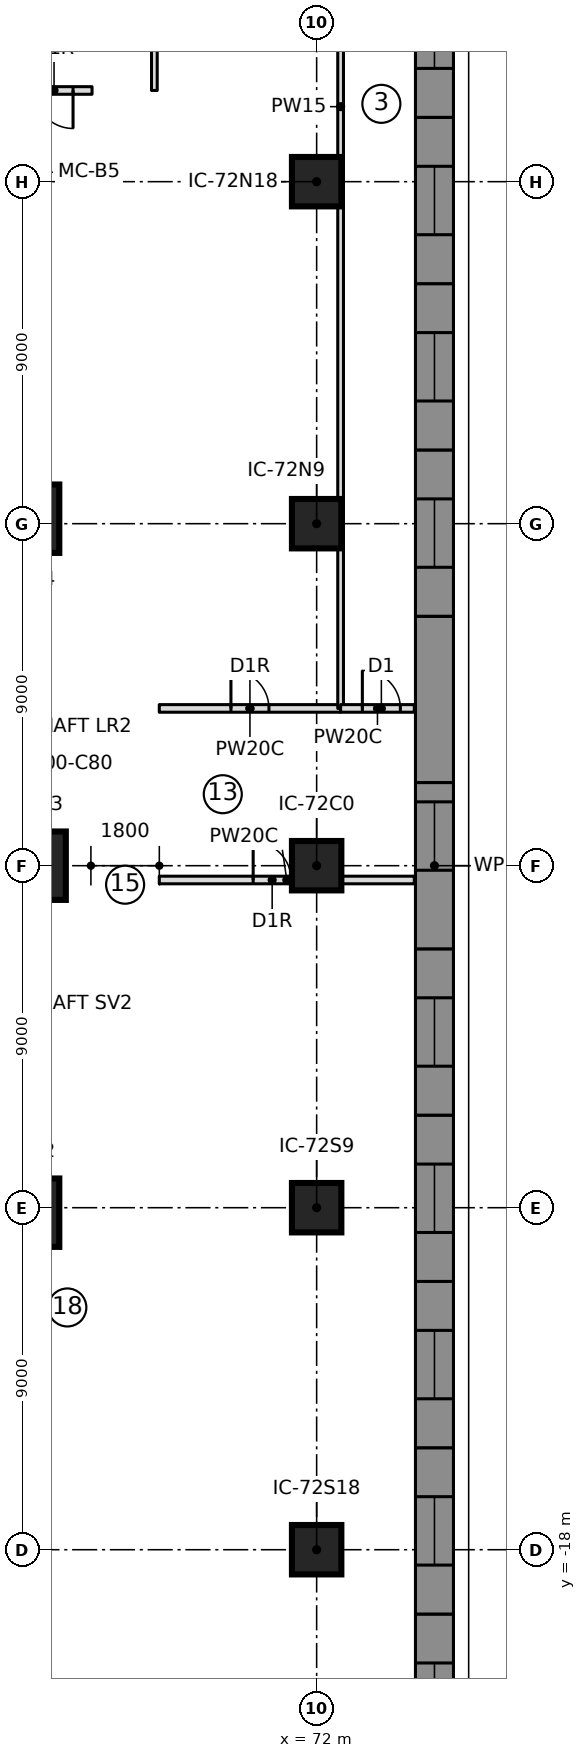
"""IFC4 building model, lengths in metres.
Left out: names, types, materials, properties, quantities, classifications, styles, units other than length and angle.
Written with IfcOpenShell. Run it as: python <this file> out.ifc"""

import sys

from ifc_helpers import new_model, si_unit, direction, frame, frame_2d, origin, origin_2d, place, context, subcontext, project, spatial, polyline, rectangle, outline, extrude, element, fill, save


model = new_model("IFC4")
c1 = context("Model", 3, precision=1e-05, world=origin(), true_north=direction((0.0, 1.0)))
c2 = subcontext(c1, "Body", "Model", "MODEL_VIEW")
j1 = project(units=[si_unit("LENGTHUNIT", "METRE"), si_unit("PLANEANGLEUNIT", "RADIAN")], contexts=[c1])
p1 = place(None, origin())
s1 = spatial("IfcSite", under=j1, at=p1, CompositionType="ELEMENT")
p2 = place(p1, origin())
s2 = spatial("IfcBuilding", under=s1, at=p2, CompositionType="ELEMENT")
p3 = place(p2, frame((0.0, 0.0, 13.5)))
s3 = spatial("IfcBuildingStorey", under=s2, at=p3, CompositionType="ELEMENT", Elevation=13.5)
for number, where, z_axis, x_axis in (
    (1, (64.328, -9.131, 0.0), (0.0, 0.0, 1.0), (1.0, 0.0, 0.0)),
    (2, (64.5, 0.0, 0.0), (0.0, 0.0, 1.0), (1.0, 0.0, 0.0)),
    (3, (64.328, 9.131, 0.0), (0.0, 0.0, 1.0), (1.0, 0.0, 0.0)),
):
    element("IfcColumn", number, at=place(p3, frame(where, z_axis=z_axis, x_axis=x_axis)), inside=s3, PredefinedType="COLUMN", context=c2, shape_type="SweptSolid", body=[
        extrude(rectangle(XDim=1.8, YDim=1.8, at=origin_2d()), origin(), (0.0, 0.0, 1.0), 5.5),
    ])
for number, where, z_axis, x_axis in (
    (4, (72.0, -18.0, 0.0), (0.0, 0.0, 1.0), (1.0, 0.0, 0.0)),
    (5, (72.0, -9.0, 0.0), (0.0, 0.0, 1.0), (1.0, 0.0, 0.0)),
    (6, (72.0, 0.0, 0.0), (0.0, 0.0, 1.0), (1.0, 0.0, 0.0)),
    (7, (72.0, 9.0, 0.0), (0.0, 0.0, 1.0), (1.0, 0.0, 0.0)),
    (8, (72.0, 18.0, 0.0), (0.0, 0.0, 1.0), (1.0, 0.0, 0.0)),
):
    element("IfcColumn", number, at=place(p3, frame(where, z_axis=z_axis, x_axis=x_axis)), inside=s3, PredefinedType="COLUMN", context=c2, shape_type="SweptSolid", body=[
        extrude(rectangle(XDim=1.3, YDim=1.3, at=origin_2d()), origin(), (0.0, 0.0, 1.0), 5.5),
    ])
p4 = place(p3, frame((75.1, -24.069, 0.0), z_axis=(0.0, 0.0, 1.0), x_axis=(0.0, 1.0, 0.0)))
e9 = element("IfcWall", 9, at=p4, inside=s3, PredefinedType="NOTDEFINED", context=c2, shape_type="SweptSolid", body=[
    extrude(outline(polyline([(0.0, -0.5), (4.376, -0.5), (4.376, 0.5), (0.0, 0.5), (0.0, -0.5)])), origin(), (0.0, 0.0, 1.0), 5.2),
])
p5 = place(p4, frame((1.288, 0.0, 0.9)))
e10 = element("IfcOpeningElement", 10, at=p5, cuts=e9, PredefinedType="OPENING", context=c2, shape_type="SweptSolid", body=[
    extrude(rectangle(XDim=1.8, YDim=2.4, at=frame_2d((0.9, 1.2))), frame((0.0, 0.51, 0.0), z_axis=(0.0, -1.0, 0.0), x_axis=(1.0, 0.0, 0.0)), (0.0, 0.0, 1.0), 1.02),
])
p6 = place(p3, frame((75.1, -19.693, 0.0), z_axis=(0.0, 0.0, 1.0), x_axis=(0.0, 1.0, 0.0)))
e11 = element("IfcWall", 11, at=p6, inside=s3, PredefinedType="NOTDEFINED", context=c2, shape_type="SweptSolid", body=[
    extrude(outline(polyline([(0.0, -0.5), (4.376, -0.5), (4.376, 0.5), (0.0, 0.5), (0.0, -0.5)])), origin(), (0.0, 0.0, 1.0), 5.2),
])
p7 = place(p6, frame((1.288, 0.0, 0.9)))
e12 = element("IfcOpeningElement", 12, at=p7, cuts=e11, PredefinedType="OPENING", context=c2, shape_type="SweptSolid", body=[
    extrude(rectangle(XDim=1.8, YDim=2.4, at=frame_2d((0.9, 1.2))), frame((0.0, 0.51, 0.0), z_axis=(0.0, -1.0, 0.0), x_axis=(1.0, 0.0, 0.0)), (0.0, 0.0, 1.0), 1.02),
])
p8 = place(p3, frame((75.1, -15.316, 0.0), z_axis=(0.0, 0.0, 1.0), x_axis=(0.0, 1.0, 0.0)))
e13 = element("IfcWall", 13, at=p8, inside=s3, PredefinedType="NOTDEFINED", context=c2, shape_type="SweptSolid", body=[
    extrude(outline(polyline([(0.0, -0.5), (4.376, -0.5), (4.376, 0.5), (0.0, 0.5), (0.0, -0.5)])), origin(), (0.0, 0.0, 1.0), 5.2),
])
p9 = place(p8, frame((1.288, 0.0, 0.9)))
e14 = element("IfcOpeningElement", 14, at=p9, cuts=e13, PredefinedType="OPENING", context=c2, shape_type="SweptSolid", body=[
    extrude(rectangle(XDim=1.8, YDim=2.4, at=frame_2d((0.9, 1.2))), frame((0.0, 0.51, 0.0), z_axis=(0.0, -1.0, 0.0), x_axis=(1.0, 0.0, 0.0)), (0.0, 0.0, 1.0), 1.02),
])
p10 = place(p3, frame((75.1, -10.94, 0.0), z_axis=(0.0, 0.0, 1.0), x_axis=(0.0, 1.0, 0.0)))
e15 = element("IfcWall", 15, at=p10, inside=s3, PredefinedType="NOTDEFINED", context=c2, shape_type="SweptSolid", body=[
    extrude(outline(polyline([(0.0, -0.5), (4.376, -0.5), (4.376, 0.5), (0.0, 0.5), (0.0, -0.5)])), origin(), (0.0, 0.0, 1.0), 5.2),
])
p11 = place(p10, frame((1.288, 0.0, 0.9)))
e16 = element("IfcOpeningElement", 16, at=p11, cuts=e15, PredefinedType="OPENING", context=c2, shape_type="SweptSolid", body=[
    extrude(rectangle(XDim=1.8, YDim=2.4, at=frame_2d((0.9, 1.2))), frame((0.0, 0.51, 0.0), z_axis=(0.0, -1.0, 0.0), x_axis=(1.0, 0.0, 0.0)), (0.0, 0.0, 1.0), 1.02),
])
p12 = place(p3, frame((75.1, -6.564, 0.0), z_axis=(0.0, 0.0, 1.0), x_axis=(0.0, 1.0, 0.0)))
e17 = element("IfcWall", 17, at=p12, inside=s3, PredefinedType="NOTDEFINED", context=c2, shape_type="SweptSolid", body=[
    extrude(outline(polyline([(0.0, -0.5), (4.376, -0.5), (4.376, 0.5), (0.0, 0.5), (0.0, -0.5)])), origin(), (0.0, 0.0, 1.0), 5.2),
])
p13 = place(p12, frame((1.288, 0.0, 0.9)))
e18 = element("IfcOpeningElement", 18, at=p13, cuts=e17, PredefinedType="OPENING", context=c2, shape_type="SweptSolid", body=[
    extrude(rectangle(XDim=1.8, YDim=2.4, at=frame_2d((0.9, 1.2))), frame((0.0, 0.51, 0.0), z_axis=(0.0, -1.0, 0.0), x_axis=(1.0, 0.0, 0.0)), (0.0, 0.0, 1.0), 1.02),
])
p14 = place(p3, frame((75.1, -2.188, 0.0), z_axis=(0.0, 0.0, 1.0), x_axis=(0.0, 1.0, 0.0)))
e19 = element("IfcWall", 19, at=p14, inside=s3, PredefinedType="NOTDEFINED", context=c2, shape_type="SweptSolid", body=[
    extrude(outline(polyline([(0.0, -0.5), (4.376, -0.5), (4.376, 0.5), (0.0, 0.5), (0.0, -0.5)])), origin(), (0.0, 0.0, 1.0), 5.2),
])
p15 = place(p14, frame((2.068, 0.0, 0.9)))
e20 = element("IfcOpeningElement", 20, at=p15, cuts=e19, PredefinedType="OPENING", context=c2, shape_type="SweptSolid", body=[
    extrude(rectangle(XDim=1.8, YDim=2.4, at=frame_2d((0.9, 1.2))), frame((0.0, 0.51, 0.0), z_axis=(0.0, -1.0, 0.0), x_axis=(1.0, 0.0, 0.0)), (0.0, 0.0, 1.0), 1.02),
])
p16 = place(p3, frame((75.1, 2.188, 0.0), z_axis=(0.0, 0.0, 1.0), x_axis=(0.0, 1.0, 0.0)))
e21 = element("IfcWall", 21, at=p16, inside=s3, PredefinedType="NOTDEFINED", context=c2, shape_type="SweptSolid", body=[
    extrude(outline(polyline([(0.0, -0.5), (4.376, -0.5), (4.376, 0.5), (0.0, 0.5), (0.0, -0.5)])), origin(), (0.0, 0.0, 1.0), 5.2),
])
p17 = place(p3, frame((75.1, 6.564, 0.0), z_axis=(0.0, 0.0, 1.0), x_axis=(0.0, 1.0, 0.0)))
e22 = element("IfcWall", 22, at=p17, inside=s3, PredefinedType="NOTDEFINED", context=c2, shape_type="SweptSolid", body=[
    extrude(outline(polyline([(0.0, -0.5), (4.376, -0.5), (4.376, 0.5), (0.0, 0.5), (0.0, -0.5)])), origin(), (0.0, 0.0, 1.0), 5.2),
])
p18 = place(p17, frame((1.288, 0.0, 0.9)))
e23 = element("IfcOpeningElement", 23, at=p18, cuts=e22, PredefinedType="OPENING", context=c2, shape_type="SweptSolid", body=[
    extrude(rectangle(XDim=1.8, YDim=2.4, at=frame_2d((0.9, 1.2))), frame((0.0, 0.51, 0.0), z_axis=(0.0, -1.0, 0.0), x_axis=(1.0, 0.0, 0.0)), (0.0, 0.0, 1.0), 1.02),
])
p19 = place(p3, frame((75.1, 10.94, 0.0), z_axis=(0.0, 0.0, 1.0), x_axis=(0.0, 1.0, 0.0)))
e24 = element("IfcWall", 24, at=p19, inside=s3, PredefinedType="NOTDEFINED", context=c2, shape_type="SweptSolid", body=[
    extrude(outline(polyline([(0.0, -0.5), (4.376, -0.5), (4.376, 0.5), (0.0, 0.5), (0.0, -0.5)])), origin(), (0.0, 0.0, 1.0), 5.2),
])
p20 = place(p19, frame((1.288, 0.0, 0.9)))
e25 = element("IfcOpeningElement", 25, at=p20, cuts=e24, PredefinedType="OPENING", context=c2, shape_type="SweptSolid", body=[
    extrude(rectangle(XDim=1.8, YDim=2.4, at=frame_2d((0.9, 1.2))), frame((0.0, 0.51, 0.0), z_axis=(0.0, -1.0, 0.0), x_axis=(1.0, 0.0, 0.0)), (0.0, 0.0, 1.0), 1.02),
])
p21 = place(p3, frame((75.1, 15.316, 0.0), z_axis=(0.0, 0.0, 1.0), x_axis=(0.0, 1.0, 0.0)))
e26 = element("IfcWall", 26, at=p21, inside=s3, PredefinedType="NOTDEFINED", context=c2, shape_type="SweptSolid", body=[
    extrude(outline(polyline([(0.0, -0.5), (4.376, -0.5), (4.376, 0.5), (0.0, 0.5), (0.0, -0.5)])), origin(), (0.0, 0.0, 1.0), 5.2),
])
p22 = place(p21, frame((1.288, 0.0, 0.9)))
e27 = element("IfcOpeningElement", 27, at=p22, cuts=e26, PredefinedType="OPENING", context=c2, shape_type="SweptSolid", body=[
    extrude(rectangle(XDim=1.8, YDim=2.4, at=frame_2d((0.9, 1.2))), frame((0.0, 0.51, 0.0), z_axis=(0.0, -1.0, 0.0), x_axis=(1.0, 0.0, 0.0)), (0.0, 0.0, 1.0), 1.02),
])
p23 = place(p3, frame((75.1, 19.693, 0.0), z_axis=(0.0, 0.0, 1.0), x_axis=(0.0, 1.0, 0.0)))
e28 = element("IfcWall", 28, at=p23, inside=s3, PredefinedType="NOTDEFINED", context=c2, shape_type="SweptSolid", body=[
    extrude(outline(polyline([(0.0, -0.5), (4.376, -0.5), (4.376, 0.5), (0.0, 0.5), (0.0, -0.5)])), origin(), (0.0, 0.0, 1.0), 5.2),
])
p24 = place(p23, frame((1.288, 0.0, 0.9)))
e29 = element("IfcOpeningElement", 29, at=p24, cuts=e28, PredefinedType="OPENING", context=c2, shape_type="SweptSolid", body=[
    extrude(rectangle(XDim=1.8, YDim=2.4, at=frame_2d((0.9, 1.2))), frame((0.0, 0.51, 0.0), z_axis=(0.0, -1.0, 0.0), x_axis=(1.0, 0.0, 0.0)), (0.0, 0.0, 1.0), 1.02),
])
p25 = place(p3, frame((67.859, -0.376, 0.0), z_axis=(0.0, 0.0, 1.0), x_axis=(1.0, 0.0, 0.0)))
e30 = element("IfcWall", 30, at=p25, inside=s3, PredefinedType="PARTITIONING", context=c2, shape_type="SweptSolid", body=[
    extrude(rectangle(XDim=6.711, YDim=0.2, at=frame_2d((3.355, 0.0))), origin(), (0.0, 0.0, 1.0), 5.15),
])
p26 = place(p25, frame((2.47, 0.0, 0.0)))
e31 = element("IfcOpeningElement", 31, at=p26, cuts=e30, PredefinedType="OPENING", context=c2, shape_type="SweptSolid", body=[
    extrude(rectangle(XDim=1.0, YDim=2.1, at=frame_2d((0.5, 1.05))), frame((0.0, 0.11, 0.0), z_axis=(0.0, -1.0, 0.0), x_axis=(1.0, 0.0, 0.0)), (0.0, 0.0, 1.0), 0.22),
])
p27 = place(p3, frame((67.73, 20.4, 0.0), z_axis=(0.0, 0.0, 1.0), x_axis=(0.0, 1.0, 0.0)))
e32 = element("IfcWall", 32, at=p27, inside=s3, PredefinedType="PARTITIONING", context=c2, shape_type="SweptSolid", body=[
    extrude(rectangle(XDim=16.2, YDim=0.15, at=frame_2d((8.1, 0.0))), origin(), (0.0, 0.0, 1.0), 5.15),
])
p28 = place(p3, frame((67.859, 4.139, 0.0), z_axis=(0.0, 0.0, 1.0), x_axis=(1.0, 0.0, 0.0)))
e33 = element("IfcWall", 33, at=p28, inside=s3, PredefinedType="PARTITIONING", context=c2, shape_type="SweptSolid", body=[
    extrude(rectangle(XDim=4.772, YDim=0.2, at=frame_2d((2.386, 0.0))), origin(), (0.0, 0.0, 1.0), 5.15),
])
p29 = place(p28, frame((1.886, 0.0, 0.0)))
e34 = element("IfcOpeningElement", 34, at=p29, cuts=e33, PredefinedType="OPENING", context=c2, shape_type="SweptSolid", body=[
    extrude(rectangle(XDim=1.0, YDim=2.1, at=frame_2d((0.5, 1.05))), frame((0.0, 0.11, 0.0), z_axis=(0.0, -1.0, 0.0), x_axis=(1.0, 0.0, 0.0)), (0.0, 0.0, 1.0), 0.22),
])
p30 = place(p3, frame((72.631, 4.139, 0.0), z_axis=(0.0, 0.0, 1.0), x_axis=(0.0, 1.0, 0.0)))
e35 = element("IfcWall", 35, at=p30, inside=s3, PredefinedType="PARTITIONING", context=c2, shape_type="SweptSolid", body=[
    extrude(rectangle(XDim=31.67, YDim=0.15, at=frame_2d((15.835, 0.0))), origin(), (0.0, 0.0, 1.0), 5.15),
])
p31 = place(p3, frame((72.631, 4.139, 0.0), z_axis=(0.0, 0.0, 1.0), x_axis=(1.0, 0.0, 0.0)))
e36 = element("IfcWall", 36, at=p31, inside=s3, PredefinedType="PARTITIONING", context=c2, shape_type="SweptSolid", body=[
    extrude(rectangle(XDim=1.939, YDim=0.2, at=frame_2d((0.97, 0.0))), origin(), (0.0, 0.0, 1.0), 5.15),
])
p32 = place(p31, frame((0.572, 0.0, 0.0)))
e37 = element("IfcOpeningElement", 37, at=p32, cuts=e36, PredefinedType="OPENING", context=c2, shape_type="SweptSolid", body=[
    extrude(rectangle(XDim=1.0, YDim=2.1, at=frame_2d((0.5, 1.05))), frame((0.0, 0.11, 0.0), z_axis=(0.0, -1.0, 0.0), x_axis=(1.0, 0.0, 0.0)), (0.0, 0.0, 1.0), 0.22),
])
p33 = place(p3, frame((66.09, 20.4, 0.0), z_axis=(0.0, 0.0, 1.0), x_axis=(-1.0, 0.0, 0.0)))
e38 = element("IfcWall", 38, at=p33, inside=s3, PredefinedType="PARTITIONING", context=c2, shape_type="SweptSolid", body=[
    extrude(rectangle(XDim=4.487, YDim=0.2, at=frame_2d((2.243, 0.0))), origin(), (0.0, 0.0, 1.0), 5.15),
])
p34 = place(p33, frame((0.5, 0.0, 0.0)))
e39 = element("IfcOpeningElement", 39, at=p34, cuts=e38, PredefinedType="OPENING", context=c2, shape_type="SweptSolid", body=[
    extrude(rectangle(XDim=1.0, YDim=2.1, at=frame_2d((0.5, 1.05))), frame((0.0, 0.11, 0.0), z_axis=(0.0, -1.0, 0.0), x_axis=(1.0, 0.0, 0.0)), (0.0, 0.0, 1.0), 0.22),
])
p35 = place(p5, origin())
e40 = element("IfcWindow", 40, at=p35, inside=s3, PartitioningType="SINGLE_PANEL", PredefinedType="WINDOW", context=c2, shape_type="SweptSolid", body=[
    extrude(rectangle(XDim=1.8, YDim=2.4, at=frame_2d((0.9, 1.2))), frame((0.0, 0.5, 0.0), z_axis=(0.0, -1.0, 0.0), x_axis=(1.0, 0.0, 0.0)), (0.0, 0.0, 1.0), 0.06),
])
fill(e10, e40)
p36 = place(p7, origin())
e41 = element("IfcWindow", 41, at=p36, inside=s3, PartitioningType="SINGLE_PANEL", PredefinedType="WINDOW", context=c2, shape_type="SweptSolid", body=[
    extrude(rectangle(XDim=1.8, YDim=2.4, at=frame_2d((0.9, 1.2))), frame((0.0, 0.5, 0.0), z_axis=(0.0, -1.0, 0.0), x_axis=(1.0, 0.0, 0.0)), (0.0, 0.0, 1.0), 0.06),
])
fill(e12, e41)
p37 = place(p9, origin())
e42 = element("IfcWindow", 42, at=p37, inside=s3, PartitioningType="SINGLE_PANEL", PredefinedType="WINDOW", context=c2, shape_type="SweptSolid", body=[
    extrude(rectangle(XDim=1.8, YDim=2.4, at=frame_2d((0.9, 1.2))), frame((0.0, 0.5, 0.0), z_axis=(0.0, -1.0, 0.0), x_axis=(1.0, 0.0, 0.0)), (0.0, 0.0, 1.0), 0.06),
])
fill(e14, e42)
p38 = place(p11, origin())
e43 = element("IfcWindow", 43, at=p38, inside=s3, PartitioningType="SINGLE_PANEL", PredefinedType="WINDOW", context=c2, shape_type="SweptSolid", body=[
    extrude(rectangle(XDim=1.8, YDim=2.4, at=frame_2d((0.9, 1.2))), frame((0.0, 0.5, 0.0), z_axis=(0.0, -1.0, 0.0), x_axis=(1.0, 0.0, 0.0)), (0.0, 0.0, 1.0), 0.06),
])
fill(e16, e43)
p39 = place(p13, origin())
e44 = element("IfcWindow", 44, at=p39, inside=s3, PartitioningType="SINGLE_PANEL", PredefinedType="WINDOW", context=c2, shape_type="SweptSolid", body=[
    extrude(rectangle(XDim=1.8, YDim=2.4, at=frame_2d((0.9, 1.2))), frame((0.0, 0.5, 0.0), z_axis=(0.0, -1.0, 0.0), x_axis=(1.0, 0.0, 0.0)), (0.0, 0.0, 1.0), 0.06),
])
fill(e18, e44)
p40 = place(p15, origin())
e45 = element("IfcWindow", 45, at=p40, inside=s3, PartitioningType="SINGLE_PANEL", PredefinedType="WINDOW", context=c2, shape_type="SweptSolid", body=[
    extrude(rectangle(XDim=1.8, YDim=2.4, at=frame_2d((0.9, 1.2))), frame((0.0, 0.5, 0.0), z_axis=(0.0, -1.0, 0.0), x_axis=(1.0, 0.0, 0.0)), (0.0, 0.0, 1.0), 0.06),
])
fill(e20, e45)
p41 = place(p18, origin())
e46 = element("IfcWindow", 46, at=p41, inside=s3, PartitioningType="SINGLE_PANEL", PredefinedType="WINDOW", context=c2, shape_type="SweptSolid", body=[
    extrude(rectangle(XDim=1.8, YDim=2.4, at=frame_2d((0.9, 1.2))), frame((0.0, 0.5, 0.0), z_axis=(0.0, -1.0, 0.0), x_axis=(1.0, 0.0, 0.0)), (0.0, 0.0, 1.0), 0.06),
])
fill(e23, e46)
p42 = place(p20, origin())
e47 = element("IfcWindow", 47, at=p42, inside=s3, PartitioningType="SINGLE_PANEL", PredefinedType="WINDOW", context=c2, shape_type="SweptSolid", body=[
    extrude(rectangle(XDim=1.8, YDim=2.4, at=frame_2d((0.9, 1.2))), frame((0.0, 0.5, 0.0), z_axis=(0.0, -1.0, 0.0), x_axis=(1.0, 0.0, 0.0)), (0.0, 0.0, 1.0), 0.06),
])
fill(e25, e47)
p43 = place(p22, origin())
e48 = element("IfcWindow", 48, at=p43, inside=s3, PartitioningType="SINGLE_PANEL", PredefinedType="WINDOW", context=c2, shape_type="SweptSolid", body=[
    extrude(rectangle(XDim=1.8, YDim=2.4, at=frame_2d((0.9, 1.2))), frame((0.0, 0.5, 0.0), z_axis=(0.0, -1.0, 0.0), x_axis=(1.0, 0.0, 0.0)), (0.0, 0.0, 1.0), 0.06),
])
fill(e27, e48)
p44 = place(p24, origin())
e49 = element("IfcWindow", 49, at=p44, inside=s3, PartitioningType="SINGLE_PANEL", PredefinedType="WINDOW", context=c2, shape_type="SweptSolid", body=[
    extrude(rectangle(XDim=1.8, YDim=2.4, at=frame_2d((0.9, 1.2))), frame((0.0, 0.5, 0.0), z_axis=(0.0, -1.0, 0.0), x_axis=(1.0, 0.0, 0.0)), (0.0, 0.0, 1.0), 0.06),
])
fill(e29, e49)
p45 = place(p26, origin())
e50 = element("IfcDoor", 50, at=p45, inside=s3, OperationType="SINGLE_SWING_RIGHT", PredefinedType="DOOR", context=c2, shape_type="SweptSolid", body=[
    extrude(rectangle(XDim=1.0, YDim=2.1, at=frame_2d((0.5, 1.05))), frame((0.0, 0.025, 0.0), z_axis=(0.0, -1.0, 0.0), x_axis=(1.0, 0.0, 0.0)), (0.0, 0.0, 1.0), 0.05),
])
fill(e31, e50)
p46 = place(p29, origin())
e51 = element("IfcDoor", 51, at=p46, inside=s3, OperationType="SINGLE_SWING_RIGHT", PredefinedType="DOOR", context=c2, shape_type="SweptSolid", body=[
    extrude(rectangle(XDim=1.0, YDim=2.1, at=frame_2d((0.5, 1.05))), frame((0.0, 0.025, 0.0), z_axis=(0.0, -1.0, 0.0), x_axis=(1.0, 0.0, 0.0)), (0.0, 0.0, 1.0), 0.05),
])
fill(e34, e51)
p47 = place(p32, origin())
e52 = element("IfcDoor", 52, at=p47, inside=s3, OperationType="SINGLE_SWING_LEFT", PredefinedType="DOOR", context=c2, shape_type="SweptSolid", body=[
    extrude(rectangle(XDim=1.0, YDim=2.1, at=frame_2d((0.5, 1.05))), frame((0.0, 0.025, 0.0), z_axis=(0.0, -1.0, 0.0), x_axis=(1.0, 0.0, 0.0)), (0.0, 0.0, 1.0), 0.05),
])
fill(e37, e52)
p48 = place(p34, origin())
e53 = element("IfcDoor", 53, at=p48, inside=s3, OperationType="SINGLE_SWING_RIGHT", PredefinedType="DOOR", context=c2, shape_type="SweptSolid", body=[
    extrude(rectangle(XDim=1.0, YDim=2.1, at=frame_2d((0.5, 1.05))), frame((0.0, 0.025, 0.0), z_axis=(0.0, -1.0, 0.0), x_axis=(1.0, 0.0, 0.0)), (0.0, 0.0, 1.0), 0.05),
])
fill(e39, e53)
save(model, sys.argv[1])
